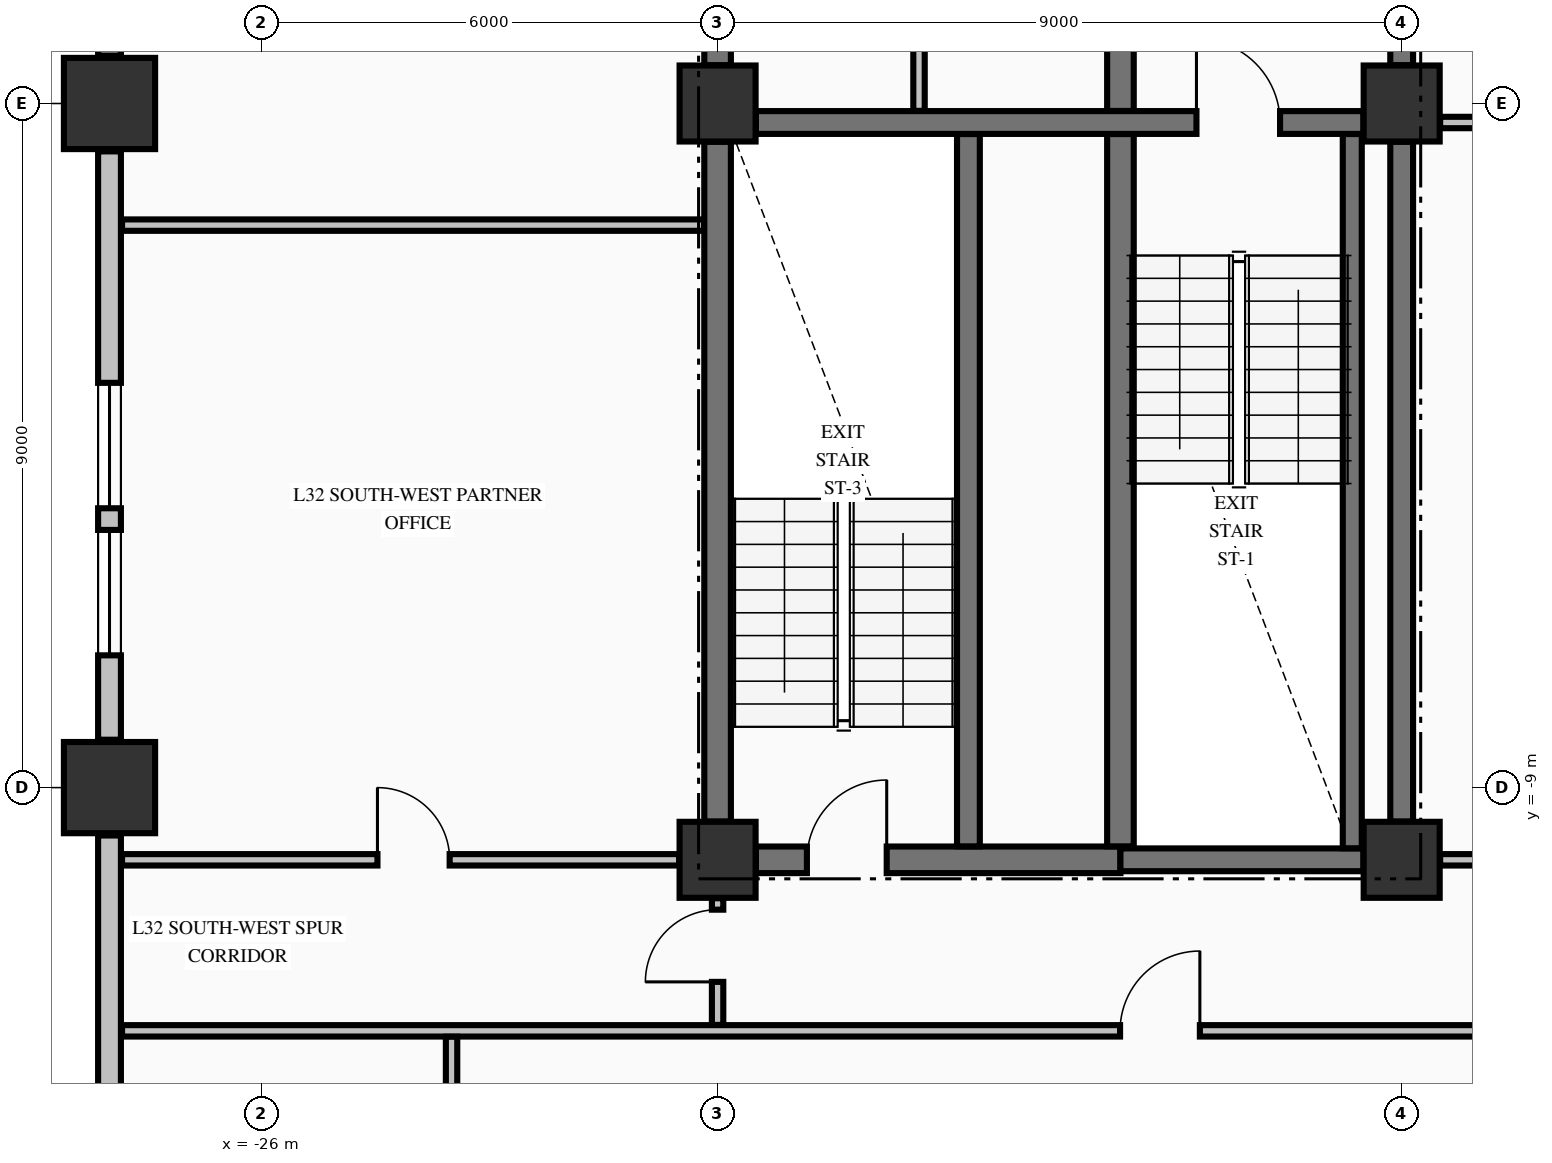
"""IFC4 building model, lengths in metres.
Left out: names, types, materials, properties, quantities, classifications, styles, units other than length and angle.
Written with IfcOpenShell. Run it as: python <this file> out.ifc"""

import sys

from ifc_helpers import new_model, si_unit, direction, frame, frame_2d, origin, origin_2d, place, context, subcontext, project, spatial, rectangle, extrude, element, fill, save


model = new_model("IFC4")
c1 = context("Model", 3, precision=1e-05, world=origin(), true_north=direction((0.0, 1.0)))
c2 = subcontext(c1, "Body", "Model", "MODEL_VIEW")
j1 = project(units=[si_unit("LENGTHUNIT", "METRE"), si_unit("PLANEANGLEUNIT", "RADIAN")], contexts=[c1])
p1 = place(None, origin())
s1 = spatial("IfcSite", under=j1, at=p1, CompositionType="ELEMENT")
p2 = place(p1, origin())
s2 = spatial("IfcBuilding", under=s1, at=p2, CompositionType="ELEMENT")
p3 = place(p2, frame((0.0, 0.0, 128.49)))
s3 = spatial("IfcBuildingStorey", under=s2, at=p3, CompositionType="ELEMENT", Elevation=128.49)
for number, where, z_axis, x_axis in (
    (1, (-28.0, -9.0, -0.25), (0.0, 0.0, 1.0), (1.0, 0.0, 0.0)),
    (2, (-28.0, 0.0, -0.25), (0.0, 0.0, 1.0), (1.0, 0.0, 0.0)),
):
    element("IfcColumn", number, at=place(p3, frame(where, z_axis=z_axis, x_axis=x_axis)), inside=s3, PredefinedType="COLUMN", context=c2, shape_type="SweptSolid", body=[
        extrude(rectangle(XDim=1.2, YDim=1.2, at=origin_2d()), origin(), (0.0, 0.0, 1.0), 3.57),
    ])
for number, where, z_axis, x_axis in (
    (3, (-20.0, -9.95, -0.25), (0.0, 0.0, 1.0), (1.0, 0.0, 0.0)),
    (4, (-11.0, -9.95, -0.25), (0.0, 0.0, 1.0), (1.0, 0.0, 0.0)),
    (5, (-11.0, 0.0, -0.25), (0.0, 0.0, 1.0), (1.0, 0.0, 0.0)),
    (6, (-20.0, 0.0, -0.25), (0.0, 0.0, 1.0), (1.0, 0.0, 0.0)),
):
    element("IfcColumn", number, at=place(p3, frame(where, z_axis=z_axis, x_axis=x_axis)), inside=s3, PredefinedType="COLUMN", context=c2, shape_type="SweptSolid", body=[
        extrude(rectangle(XDim=1.0, YDim=1.0, at=origin_2d()), origin(), (0.0, 0.0, 1.0), 3.57),
    ])
p4 = place(p3, frame((-28.0, -9.63, 0.0), z_axis=(0.0, 0.0, 1.0), x_axis=(0.0, -1.0, 0.0)))
e7 = element("IfcWall", 7, at=p4, inside=s3, PredefinedType="STANDARD", context=c2, shape_type="SweptSolid", body=[
    extrude(rectangle(XDim=10.74, YDim=0.3, at=frame_2d((5.37, 0.0))), origin(), (0.0, 0.0, 1.0), 2.712),
])
p5 = place(p3, frame((-28.0, -0.63, 0.0), z_axis=(0.0, 0.0, 1.0), x_axis=(0.0, -1.0, 0.0)))
e8 = element("IfcWall", 8, at=p5, inside=s3, PredefinedType="STANDARD", context=c2, shape_type="SweptSolid", body=[
    extrude(rectangle(XDim=7.74, YDim=0.3, at=frame_2d((3.87, 0.0))), origin(), (0.0, 0.0, 1.0), 2.712),
])
p6 = place(p5, frame((3.045, 0.0, 0.8)))
e9 = element("IfcOpeningElement", 9, at=p6, cuts=e8, PredefinedType="OPENING", context=c2, shape_type="SweptSolid", body=[
    extrude(rectangle(XDim=1.65, YDim=1.7, at=frame_2d((0.825, 0.85))), frame((0.0, 0.16, 0.0), z_axis=(0.0, -1.0, 0.0), x_axis=(1.0, 0.0, 0.0)), (0.0, 0.0, 1.0), 0.32),
])
p7 = place(p5, frame((4.98, 0.0, 0.8)))
e10 = element("IfcOpeningElement", 10, at=p7, cuts=e8, PredefinedType="OPENING", context=c2, shape_type="SweptSolid", body=[
    extrude(rectangle(XDim=1.65, YDim=1.7, at=frame_2d((0.825, 0.85))), frame((0.0, 0.16, 0.0), z_axis=(0.0, -1.0, 0.0), x_axis=(1.0, 0.0, 0.0)), (0.0, 0.0, 1.0), 0.32),
])
p8 = place(p3, frame((-28.0, 8.37, 0.0), z_axis=(0.0, 0.0, 1.0), x_axis=(0.0, -1.0, 0.0)))
e11 = element("IfcWall", 11, at=p8, inside=s3, PredefinedType="STANDARD", context=c2, shape_type="SweptSolid", body=[
    extrude(rectangle(XDim=7.74, YDim=0.3, at=frame_2d((3.87, 0.0))), origin(), (0.0, 0.0, 1.0), 2.712),
])
p9 = place(p8, frame((1.11, 0.0, 0.8)))
e12 = element("IfcOpeningElement", 12, at=p9, cuts=e11, PredefinedType="OPENING", context=c2, shape_type="SweptSolid", body=[
    extrude(rectangle(XDim=1.65, YDim=1.7, at=frame_2d((0.825, 0.85))), frame((0.0, 0.16, 0.0), z_axis=(0.0, -1.0, 0.0), x_axis=(1.0, 0.0, 0.0)), (0.0, 0.0, 1.0), 0.32),
])
p10 = place(p8, frame((3.045, 0.0, 0.8)))
e13 = element("IfcOpeningElement", 13, at=p10, cuts=e11, PredefinedType="OPENING", context=c2, shape_type="SweptSolid", body=[
    extrude(rectangle(XDim=1.65, YDim=1.7, at=frame_2d((0.825, 0.85))), frame((0.0, 0.16, 0.0), z_axis=(0.0, -1.0, 0.0), x_axis=(1.0, 0.0, 0.0)), (0.0, 0.0, 1.0), 0.32),
])
p11 = place(p8, frame((4.98, 0.0, 0.8)))
e14 = element("IfcOpeningElement", 14, at=p11, cuts=e11, PredefinedType="OPENING", context=c2, shape_type="SweptSolid", body=[
    extrude(rectangle(XDim=1.65, YDim=1.7, at=frame_2d((0.825, 0.85))), frame((0.0, 0.16, 0.0), z_axis=(0.0, -1.0, 0.0), x_axis=(1.0, 0.0, 0.0)), (0.0, 0.0, 1.0), 0.32),
])
p12 = place(p3, frame((-19.496, -9.95, 0.0), z_axis=(0.0, 0.0, 1.0), x_axis=(1.0, 0.0, 0.0)))
e15 = element("IfcWall", 15, at=p12, inside=s3, PredefinedType="SHEAR", context=c2, shape_type="SweptSolid", body=[
    extrude(rectangle(XDim=4.796, YDim=0.35, at=frame_2d((2.398, 0.0))), origin(), (0.0, 0.0, 1.0), 3.32),
])
p13 = place(p12, frame((0.671, 0.0, 0.0)))
e16 = element("IfcOpeningElement", 16, at=p13, cuts=e15, PredefinedType="OPENING", context=c2, shape_type="SweptSolid", body=[
    extrude(rectangle(XDim=1.05, YDim=2.15, at=frame_2d((0.525, 1.075))), frame((0.0, 0.185, 0.0), z_axis=(0.0, -1.0, 0.0), x_axis=(1.0, 0.0, 0.0)), (0.0, 0.0, 1.0), 0.37),
])
p14 = place(p3, frame((-14.7, -9.95, 0.0), z_axis=(0.0, 0.0, 1.0), x_axis=(1.0, 0.0, 0.0)))
e17 = element("IfcWall", 17, at=p14, inside=s3, PredefinedType="SHEAR", context=c2, shape_type="SweptSolid", body=[
    extrude(rectangle(XDim=3.196, YDim=0.3, at=frame_2d((1.598, 0.0))), origin(), (0.0, 0.0, 1.0), 3.32),
])
p15 = place(p3, frame((-19.496, -0.25, 0.0), z_axis=(0.0, 0.0, 1.0), x_axis=(1.0, 0.0, 0.0)))
e18 = element("IfcWall", 18, at=p15, inside=s3, PredefinedType="SHEAR", context=c2, shape_type="SweptSolid", body=[
    extrude(rectangle(XDim=7.992, YDim=0.3, at=frame_2d((3.996, 0.0))), origin(), (0.0, 0.0, 1.0), 3.32),
])
p16 = place(p15, frame((5.796, 0.0, 0.0)))
e19 = element("IfcOpeningElement", 19, at=p16, cuts=e18, PredefinedType="OPENING", context=c2, shape_type="SweptSolid", body=[
    extrude(rectangle(XDim=1.1, YDim=2.15, at=frame_2d((0.55, 1.075))), frame((0.0, 0.16, 0.0), z_axis=(0.0, -1.0, 0.0), x_axis=(1.0, 0.0, 0.0)), (0.0, 0.0, 1.0), 0.32),
])
p17 = place(p3, frame((-27.835, -12.2, 0.0), z_axis=(0.0, 0.0, 1.0), x_axis=(1.0, 0.0, 0.0)))
e20 = element("IfcWall", 20, at=p17, inside=s3, PredefinedType="PARTITIONING", context=c2, shape_type="SweptSolid", body=[
    extrude(rectangle(XDim=50.67, YDim=0.15, at=frame_2d((25.335, 0.0))), origin(), (0.0, 0.0, 1.0), 3.32),
])
p18 = place(p17, frame((13.13, 0.0, 0.0)))
e21 = element("IfcOpeningElement", 21, at=p18, cuts=e20, PredefinedType="OPENING", context=c2, shape_type="SweptSolid", body=[
    extrude(rectangle(XDim=1.05, YDim=2.15, at=frame_2d((0.525, 1.075))), frame((0.0, 0.085, 0.0), z_axis=(0.0, -1.0, 0.0), x_axis=(1.0, 0.0, 0.0)), (0.0, 0.0, 1.0), 0.17),
])
p19 = place(p17, frame((24.26, 0.0, 0.0)))
e22 = element("IfcOpeningElement", 22, at=p19, cuts=e20, PredefinedType="OPENING", context=c2, shape_type="SweptSolid", body=[
    extrude(rectangle(XDim=1.05, YDim=2.15, at=frame_2d((0.525, 1.075))), frame((0.0, 0.085, 0.0), z_axis=(0.0, -1.0, 0.0), x_axis=(1.0, 0.0, 0.0)), (0.0, 0.0, 1.0), 0.17),
])
p20 = place(p17, frame((44.16, 0.0, 0.0)))
e23 = element("IfcOpeningElement", 23, at=p20, cuts=e20, PredefinedType="OPENING", context=c2, shape_type="SweptSolid", body=[
    extrude(rectangle(XDim=1.05, YDim=2.15, at=frame_2d((0.525, 1.075))), frame((0.0, 0.085, 0.0), z_axis=(0.0, -1.0, 0.0), x_axis=(1.0, 0.0, 0.0)), (0.0, 0.0, 1.0), 0.17),
])
p21 = place(p3, frame((-27.835, -9.95, 0.0), z_axis=(0.0, 0.0, 1.0), x_axis=(1.0, 0.0, 0.0)))
e24 = element("IfcWall", 24, at=p21, inside=s3, PredefinedType="PARTITIONING", context=c2, shape_type="SweptSolid", body=[
    extrude(rectangle(XDim=7.329, YDim=0.15, at=frame_2d((3.665, 0.0))), origin(), (0.0, 0.0, 1.0), 3.32),
])
p22 = place(p21, frame((3.36, 0.0, 0.0)))
e25 = element("IfcOpeningElement", 25, at=p22, cuts=e24, PredefinedType="OPENING", context=c2, shape_type="SweptSolid", body=[
    extrude(rectangle(XDim=0.95, YDim=2.15, at=frame_2d((0.475, 1.075))), frame((0.0, 0.085, 0.0), z_axis=(0.0, -1.0, 0.0), x_axis=(1.0, 0.0, 0.0)), (0.0, 0.0, 1.0), 0.17),
])
p23 = place(p3, frame((-10.494, -9.95, 0.0), z_axis=(0.0, 0.0, 1.0), x_axis=(1.0, 0.0, 0.0)))
e26 = element("IfcWall", 26, at=p23, inside=s3, PredefinedType="PARTITIONING", context=c2, shape_type="SweptSolid", body=[
    extrude(rectangle(XDim=20.988, YDim=0.15, at=frame_2d((10.494, 0.0))), origin(), (0.0, 0.0, 1.0), 3.32),
])
p24 = place(p23, frame((5.444, 0.0, 0.0)))
e27 = element("IfcOpeningElement", 27, at=p24, cuts=e26, PredefinedType="OPENING", context=c2, shape_type="SweptSolid", body=[
    extrude(rectangle(XDim=1.1, YDim=2.15, at=frame_2d((0.55, 1.075))), frame((0.0, 0.085, 0.0), z_axis=(0.0, -1.0, 0.0), x_axis=(1.0, 0.0, 0.0)), (0.0, 0.0, 1.0), 0.17),
])
p25 = place(p23, frame((13.619, 0.0, 0.0)))
e28 = element("IfcOpeningElement", 28, at=p25, cuts=e26, PredefinedType="OPENING", context=c2, shape_type="SweptSolid", body=[
    extrude(rectangle(XDim=0.95, YDim=2.15, at=frame_2d((0.475, 1.075))), frame((0.0, 0.085, 0.0), z_axis=(0.0, -1.0, 0.0), x_axis=(1.0, 0.0, 0.0)), (0.0, 0.0, 1.0), 0.17),
])
p26 = place(p23, frame((17.844, 0.0, 0.0)))
e29 = element("IfcOpeningElement", 29, at=p26, cuts=e26, PredefinedType="OPENING", context=c2, shape_type="SweptSolid", body=[
    extrude(rectangle(XDim=0.9, YDim=2.15, at=frame_2d((0.45, 1.075))), frame((0.0, 0.085, 0.0), z_axis=(0.0, -1.0, 0.0), x_axis=(1.0, 0.0, 0.0)), (0.0, 0.0, 1.0), 0.17),
])
p27 = place(p3, frame((-27.835, -1.6, 0.0), z_axis=(0.0, 0.0, 1.0), x_axis=(1.0, 0.0, 0.0)))
e30 = element("IfcWall", 30, at=p27, inside=s3, PredefinedType="PARTITIONING", context=c2, shape_type="SweptSolid", body=[
    extrude(rectangle(XDim=7.657, YDim=0.15, at=frame_2d((3.829, 0.0))), origin(), (0.0, 0.0, 1.0), 3.32),
])
p28 = place(p3, frame((-10.494, -0.25, 0.0), z_axis=(0.0, 0.0, 1.0), x_axis=(1.0, 0.0, 0.0)))
e31 = element("IfcWall", 31, at=p28, inside=s3, PredefinedType="PARTITIONING", context=c2, shape_type="SweptSolid", body=[
    extrude(rectangle(XDim=20.988, YDim=0.15, at=frame_2d((10.494, 0.0))), origin(), (0.0, 0.0, 1.0), 3.32),
])
p29 = place(p28, frame((5.444, 0.0, 0.0)))
e32 = element("IfcOpeningElement", 32, at=p29, cuts=e31, PredefinedType="OPENING", context=c2, shape_type="SweptSolid", body=[
    extrude(rectangle(XDim=1.1, YDim=2.15, at=frame_2d((0.55, 1.075))), frame((0.0, 0.085, 0.0), z_axis=(0.0, -1.0, 0.0), x_axis=(1.0, 0.0, 0.0)), (0.0, 0.0, 1.0), 0.17),
])
p30 = place(p28, frame((1.669, 0.0, 0.0)))
e33 = element("IfcOpeningElement", 33, at=p30, cuts=e31, PredefinedType="OPENING", context=c2, shape_type="SweptSolid", body=[
    extrude(rectangle(XDim=1.05, YDim=2.15, at=frame_2d((0.525, 1.075))), frame((0.0, 0.085, 0.0), z_axis=(0.0, -1.0, 0.0), x_axis=(1.0, 0.0, 0.0)), (0.0, 0.0, 1.0), 0.17),
])
p31 = place(p28, frame((13.819, 0.0, 0.0)))
e34 = element("IfcOpeningElement", 34, at=p31, cuts=e31, PredefinedType="OPENING", context=c2, shape_type="SweptSolid", body=[
    extrude(rectangle(XDim=0.95, YDim=2.15, at=frame_2d((0.475, 1.075))), frame((0.0, 0.085, 0.0), z_axis=(0.0, -1.0, 0.0), x_axis=(1.0, 0.0, 0.0)), (0.0, 0.0, 1.0), 0.17),
])
p32 = place(p3, frame((-20.0, -9.446, 0.0), z_axis=(0.0, 0.0, 1.0), x_axis=(0.0, 1.0, 0.0)))
e35 = element("IfcWall", 35, at=p32, inside=s3, PredefinedType="SHEAR", context=c2, shape_type="SweptSolid", body=[
    extrude(rectangle(XDim=8.942, YDim=0.35, at=frame_2d((4.471, 0.0))), origin(), (0.0, 0.0, 1.0), 3.32),
])
p33 = place(p3, frame((-20.0, 0.504, 0.0), z_axis=(0.0, 0.0, 1.0), x_axis=(0.0, 1.0, 0.0)))
e36 = element("IfcWall", 36, at=p33, inside=s3, PredefinedType="SHEAR", context=c2, shape_type="SweptSolid", body=[
    extrude(rectangle(XDim=9.492, YDim=0.35, at=frame_2d((4.746, 0.0))), origin(), (0.0, 0.0, 1.0), 3.32),
])
p34 = place(p3, frame((-16.7, -9.773, 0.0), z_axis=(0.0, 0.0, 1.0), x_axis=(0.0, 1.0, 0.0)))
e37 = element("IfcWall", 37, at=p34, inside=s3, PredefinedType="SHEAR", context=c2, shape_type="SweptSolid", body=[
    extrude(rectangle(XDim=9.371, YDim=0.3, at=frame_2d((4.686, 0.0))), origin(), (0.0, 0.0, 1.0), 3.32),
])
p35 = place(p3, frame((-14.7, -9.773, 0.0), z_axis=(0.0, 0.0, 1.0), x_axis=(0.0, 1.0, 0.0)))
e38 = element("IfcWall", 38, at=p35, inside=s3, PredefinedType="SHEAR", context=c2, shape_type="SweptSolid", body=[
    extrude(rectangle(XDim=9.371, YDim=0.35, at=frame_2d((4.686, 0.0))), origin(), (0.0, 0.0, 1.0), 3.32),
])
p36 = place(p3, frame((-14.7, -0.098, 0.0), z_axis=(0.0, 0.0, 1.0), x_axis=(0.0, 1.0, 0.0)))
e39 = element("IfcWall", 39, at=p36, inside=s3, PredefinedType="SHEAR", context=c2, shape_type="SweptSolid", body=[
    extrude(rectangle(XDim=2.846, YDim=0.35, at=frame_2d((1.423, 0.0))), origin(), (0.0, 0.0, 1.0), 3.32),
])
p37 = place(p3, frame((-11.65, -9.798, 0.0), z_axis=(0.0, 0.0, 1.0), x_axis=(0.0, 1.0, 0.0)))
e40 = element("IfcWall", 40, at=p37, inside=s3, PredefinedType="SOLIDWALL", context=c2, shape_type="SweptSolid", body=[
    extrude(rectangle(XDim=9.396, YDim=0.25, at=frame_2d((4.698, 0.0))), origin(), (0.0, 0.0, 1.0), 3.32),
])
p38 = place(p3, frame((-11.0, -9.446, 0.0), z_axis=(0.0, 0.0, 1.0), x_axis=(0.0, 1.0, 0.0)))
e41 = element("IfcWall", 41, at=p38, inside=s3, PredefinedType="SHEAR", context=c2, shape_type="SweptSolid", body=[
    extrude(rectangle(XDim=8.942, YDim=0.3, at=frame_2d((4.471, 0.0))), origin(), (0.0, 0.0, 1.0), 3.32),
])
p39 = place(p3, frame((-11.0, 0.504, 0.0), z_axis=(0.0, 0.0, 1.0), x_axis=(0.0, 1.0, 0.0)))
e42 = element("IfcWall", 42, at=p39, inside=s3, PredefinedType="SHEAR", context=c2, shape_type="SweptSolid", body=[
    extrude(rectangle(XDim=2.244, YDim=0.3, at=frame_2d((1.122, 0.0))), origin(), (0.0, 0.0, 1.0), 3.32),
])
p40 = place(p39, frame((0.596, 0.0, 0.0)))
e43 = element("IfcOpeningElement", 43, at=p40, cuts=e42, PredefinedType="OPENING", context=c2, shape_type="SweptSolid", body=[
    extrude(rectangle(XDim=1.1, YDim=2.15, at=frame_2d((0.55, 1.075))), frame((0.0, 0.16, 0.0), z_axis=(0.0, -1.0, 0.0), x_axis=(1.0, 0.0, 0.0)), (0.0, 0.0, 1.0), 0.32),
])
p41 = place(p3, frame((-23.5, -20.394, 0.0), z_axis=(0.0, 0.0, 1.0), x_axis=(0.0, 1.0, 0.0)))
e44 = element("IfcWall", 44, at=p41, inside=s3, PredefinedType="PARTITIONING", context=c2, shape_type="SweptSolid", body=[
    extrude(rectangle(XDim=8.116, YDim=0.15, at=frame_2d((4.058, 0.0))), origin(), (0.0, 0.0, 1.0), 3.32),
])
p42 = place(p3, frame((-20.0, -12.122, 0.0), z_axis=(0.0, 0.0, 1.0), x_axis=(0.0, 1.0, 0.0)))
e45 = element("IfcWall", 45, at=p42, inside=s3, PredefinedType="PARTITIONING", context=c2, shape_type="SweptSolid", body=[
    extrude(rectangle(XDim=1.666, YDim=0.15, at=frame_2d((0.833, 0.0))), origin(), (0.0, 0.0, 1.0), 2.81),
])
p43 = place(p42, frame((0.566, 0.0, 0.0)))
e46 = element("IfcOpeningElement", 46, at=p43, cuts=e45, PredefinedType="OPENING", context=c2, shape_type="SweptSolid", body=[
    extrude(rectangle(XDim=0.95, YDim=2.15, at=frame_2d((0.475, 1.075))), frame((0.0, 0.085, 0.0), z_axis=(0.0, -1.0, 0.0), x_axis=(1.0, 0.0, 0.0)), (0.0, 0.0, 1.0), 0.17),
])
p44 = place(p3, frame((-17.35, -0.097, 0.0), z_axis=(0.0, 0.0, 1.0), x_axis=(0.0, 1.0, 0.0)))
e47 = element("IfcWall", 47, at=p44, inside=s3, PredefinedType="PARTITIONING", context=c2, shape_type="SweptSolid", body=[
    extrude(rectangle(XDim=5.119, YDim=0.15, at=frame_2d((2.56, 0.0))), origin(), (0.0, 0.0, 1.0), 3.32),
])
p45 = place(p6, origin())
e48 = element("IfcWindow", 48, at=p45, inside=s3, PartitioningType="SINGLE_PANEL", PredefinedType="WINDOW", context=c2, shape_type="SweptSolid", body=[
    extrude(rectangle(XDim=1.65, YDim=1.7, at=frame_2d((0.825, 0.85))), frame((0.0, 0.03, 0.0), z_axis=(0.0, -1.0, 0.0), x_axis=(1.0, 0.0, 0.0)), (0.0, 0.0, 1.0), 0.06),
])
fill(e9, e48)
p46 = place(p7, origin())
e49 = element("IfcWindow", 49, at=p46, inside=s3, PartitioningType="SINGLE_PANEL", PredefinedType="WINDOW", context=c2, shape_type="SweptSolid", body=[
    extrude(rectangle(XDim=1.65, YDim=1.7, at=frame_2d((0.825, 0.85))), frame((0.0, 0.03, 0.0), z_axis=(0.0, -1.0, 0.0), x_axis=(1.0, 0.0, 0.0)), (0.0, 0.0, 1.0), 0.06),
])
fill(e10, e49)
p47 = place(p16, origin())
e50 = element("IfcDoor", 50, at=p47, inside=s3, OperationType="SINGLE_SWING_LEFT", PredefinedType="DOOR", context=c2, shape_type="SweptSolid", body=[
    extrude(rectangle(XDim=1.1, YDim=2.15, at=frame_2d((0.55, 1.075))), frame((0.0, 0.025, 0.0), z_axis=(0.0, -1.0, 0.0), x_axis=(1.0, 0.0, 0.0)), (0.0, 0.0, 1.0), 0.05),
])
fill(e19, e50)
p48 = place(p13, origin())
e51 = element("IfcDoor", 51, at=p48, inside=s3, OperationType="SINGLE_SWING_RIGHT", PredefinedType="DOOR", context=c2, shape_type="SweptSolid", body=[
    extrude(rectangle(XDim=1.05, YDim=2.15, at=frame_2d((0.525, 1.075))), frame((0.0, 0.025, 0.0), z_axis=(0.0, -1.0, 0.0), x_axis=(1.0, 0.0, 0.0)), (0.0, 0.0, 1.0), 0.05),
])
fill(e16, e51)
p49 = place(p18, origin())
e52 = element("IfcDoor", 52, at=p49, inside=s3, OperationType="SINGLE_SWING_RIGHT", PredefinedType="DOOR", context=c2, shape_type="SweptSolid", body=[
    extrude(rectangle(XDim=1.05, YDim=2.15, at=frame_2d((0.525, 1.075))), frame((0.0, 0.025, 0.0), z_axis=(0.0, -1.0, 0.0), x_axis=(1.0, 0.0, 0.0)), (0.0, 0.0, 1.0), 0.05),
])
fill(e21, e52)
p50 = place(p43, origin())
e53 = element("IfcDoor", 53, at=p50, inside=s3, OperationType="SINGLE_SWING_LEFT", PredefinedType="DOOR", context=c2, shape_type="SweptSolid", body=[
    extrude(rectangle(XDim=0.95, YDim=2.15, at=frame_2d((0.475, 1.075))), frame((0.0, 0.025, 0.0), z_axis=(0.0, -1.0, 0.0), x_axis=(1.0, 0.0, 0.0)), (0.0, 0.0, 1.0), 0.05),
])
fill(e46, e53)
p51 = place(p22, origin())
e54 = element("IfcDoor", 54, at=p51, inside=s3, OperationType="SINGLE_SWING_LEFT", PredefinedType="DOOR", context=c2, shape_type="SweptSolid", body=[
    extrude(rectangle(XDim=0.95, YDim=2.15, at=frame_2d((0.475, 1.075))), frame((0.0, 0.025, 0.0), z_axis=(0.0, -1.0, 0.0), x_axis=(1.0, 0.0, 0.0)), (0.0, 0.0, 1.0), 0.05),
])
fill(e25, e54)
save(model, sys.argv[1])
